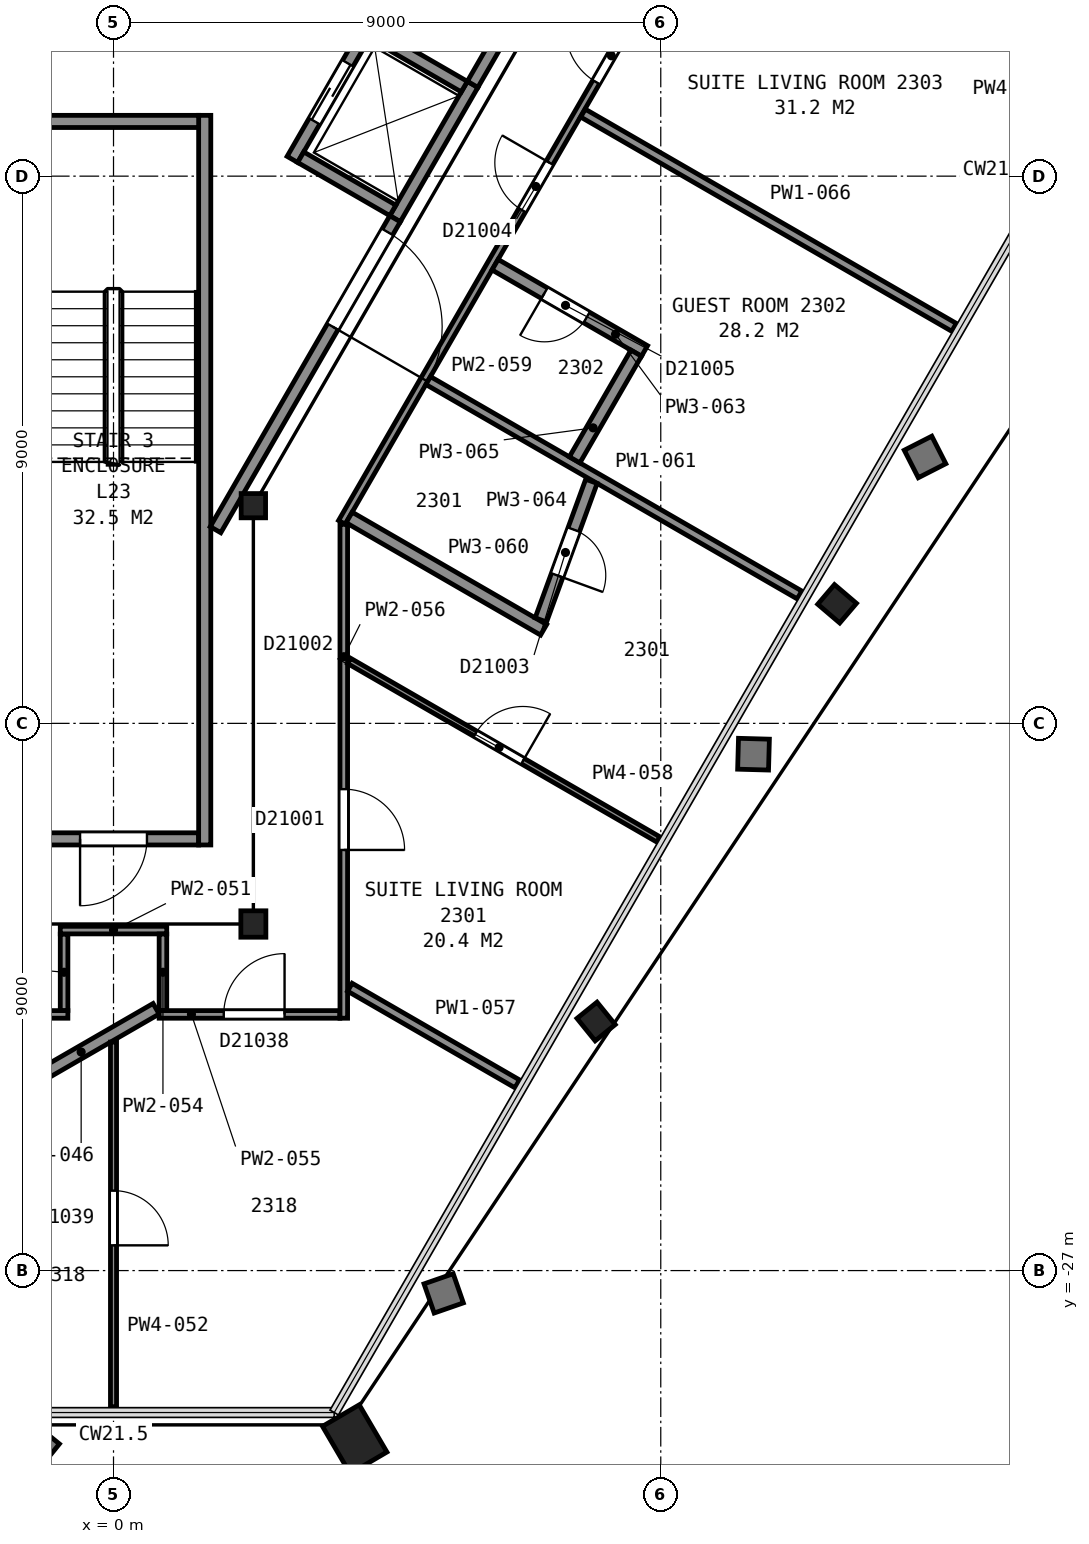
"""IFC4 building model, lengths in metres.
Left out: names, types, materials, properties, quantities, classifications, styles, units other than length and angle.
Written with IfcOpenShell. Run it as: python <this file> out.ifc"""

import sys

from ifc_helpers import new_model, si_unit, direction, frame, frame_2d, origin, origin_2d, place, context, subcontext, project, spatial, rectangle, hollow_rectangle, i_section, extrude, element, fill, save


model = new_model("IFC4")
c1 = context("Model", 3, precision=1e-05, world=origin(), true_north=direction((0.0, 1.0)))
c2 = subcontext(c1, "Body", "Model", "MODEL_VIEW")
j1 = project(units=[si_unit("LENGTHUNIT", "METRE"), si_unit("PLANEANGLEUNIT", "RADIAN")], contexts=[c1])
p1 = place(None, origin())
s1 = spatial("IfcSite", under=j1, at=p1, CompositionType="ELEMENT")
p2 = place(p1, origin())
s2 = spatial("IfcBuilding", under=s1, at=p2, CompositionType="ELEMENT")
p3 = place(p2, frame((0.0, 0.0, 100.0)))
s3 = spatial("IfcBuildingStorey", under=s2, at=p3, CompositionType="ELEMENT", Elevation=100.0)
p4 = place(p3, frame((3.838, -29.555, 0.075), z_axis=(0.111147334109, -0.189640824097, 0.975542222539), x_axis=(-0.993578089835, -0.000278243023, 0.113148141749)))
e1 = element("IfcColumn", 1, at=p4, inside=s3, PredefinedType="COLUMN", context=c2, shape_type="SweptSolid", body=[
    extrude(hollow_rectangle(XDim=0.7, YDim=0.9, WallThickness=0.065, at=origin_2d()), origin(), (0.0, 0.0, 1.0), 3.536),
])
p5 = place(p3, frame((7.786, -22.717, 0.045), z_axis=(0.127836504711, -0.157735399526, 0.979171778494), x_axis=(-0.498572298462, -0.863680403358, -0.074039341307)))
e2 = element("IfcColumn", 2, at=p5, inside=s3, PredefinedType="COLUMN", context=c2, shape_type="SweptSolid", body=[
    extrude(i_section(OverallWidth=0.424, OverallDepth=0.475, WebThickness=0.048, FlangeThickness=0.077, FilletRadius=0.015, at=origin_2d()), origin(), (0.0, 0.0, 1.0), 3.585),
])
p6 = place(p3, frame((11.726, -15.885, 0.04), z_axis=(0.147122626848, -0.12541489421, 0.981135075807), x_axis=(-0.499983433804, -0.865301512417, -0.035635074456)))
e3 = element("IfcColumn", 3, at=p6, inside=s3, PredefinedType="COLUMN", context=c2, shape_type="SweptSolid", body=[
    extrude(i_section(OverallWidth=0.424, OverallDepth=0.475, WebThickness=0.048, FlangeThickness=0.077, FilletRadius=0.015, at=origin_2d()), origin(), (0.0, 0.0, 1.0), 3.588),
])
p7 = place(p3, frame((2.3, -21.3, 0.0), z_axis=(0.0, 0.0, 1.0), x_axis=(-1.0, 0.0, 0.0)))
e4 = element("IfcColumn", 4, at=p7, inside=s3, PredefinedType="COLUMN", context=c2, shape_type="SweptSolid", body=[
    extrude(i_section(OverallWidth=0.411, OverallDepth=0.434, WebThickness=0.036, FlangeThickness=0.057, FilletRadius=0.015, at=origin_2d()), origin(), (0.0, 0.0, 1.0), 3.6),
])
p8 = place(p3, frame((2.3, -14.42, 0.0), z_axis=(0.0, 0.0, 1.0), x_axis=(1.0, 0.0, 0.0)))
e5 = element("IfcColumn", 5, at=p8, inside=s3, PredefinedType="COLUMN", context=c2, shape_type="SweptSolid", body=[
    extrude(i_section(OverallWidth=0.401, OverallDepth=0.399, WebThickness=0.025, FlangeThickness=0.04, FilletRadius=0.015, at=origin_2d()), origin(), (0.0, 0.0, 1.0), 3.6),
])
p9 = place(p3, frame((-1.4, -19.9, 0.0), z_axis=(0.0, 0.0, 1.0), x_axis=(1.0, 0.0, 0.0)))
e6 = element("IfcWall", 6, at=p9, inside=s3, PredefinedType="PARTITIONING", context=c2, shape_type="SweptSolid", body=[
    extrude(rectangle(XDim=2.8, YDim=0.2, at=frame_2d((1.4, 0.0))), origin(), (0.0, 0.0, 1.0), 3.35),
])
p10 = place(p9, frame((0.85, 0.0, 0.0)))
e7 = element("IfcOpeningElement", 7, at=p10, cuts=e6, PredefinedType="OPENING", context=c2, shape_type="SweptSolid", body=[
    extrude(rectangle(XDim=1.1, YDim=2.1, at=frame_2d((0.55, 1.05))), frame((0.0, 0.11, 0.0), z_axis=(0.0, -1.0, 0.0), x_axis=(1.0, 0.0, 0.0)), (0.0, 0.0, 1.0), 0.22),
])
p11 = place(p3, frame((1.5, -8.0, 0.0), z_axis=(0.0, 0.0, 1.0), x_axis=(0.0, -1.0, 0.0)))
e8 = element("IfcWall", 8, at=p11, inside=s3, PredefinedType="PARTITIONING", context=c2, shape_type="SweptSolid", body=[
    extrude(rectangle(XDim=12.0, YDim=0.2, at=frame_2d((6.0, 0.0))), origin(), (0.0, 0.0, 1.0), 3.35),
])
p12 = place(p3, frame((-1.4, -8.1, 0.0), z_axis=(0.0, 0.0, 1.0), x_axis=(1.0, 0.0, 0.0)))
e9 = element("IfcWall", 9, at=p12, inside=s3, PredefinedType="PARTITIONING", context=c2, shape_type="SweptSolid", body=[
    extrude(rectangle(XDim=2.8, YDim=0.2, at=frame_2d((1.4, 0.0))), origin(), (0.0, 0.0, 1.0), 3.35),
])
p13 = place(p3, frame((4.63, -9.7, 0.0), z_axis=(0.0, 0.0, 1.0), x_axis=(0.500062241894, 0.865989465428, 0.0)))
e10 = element("IfcWall", 10, at=p13, inside=s3, PredefinedType="PARTITIONING", context=c2, shape_type="SweptSolid", body=[
    extrude(rectangle(XDim=2.55, YDim=0.2, at=frame_2d((1.275, 0.0))), origin(), (0.0, 0.0, 1.0), 3.6),
])
p14 = place(p3, frame((2.942, -8.725, 0.0), z_axis=(0.0, 0.0, 1.0), x_axis=(0.500020783669, 0.866013403995, 0.0)))
e11 = element("IfcWall", 11, at=p14, inside=s3, PredefinedType="PARTITIONING", context=c2, shape_type="SweptSolid", body=[
    extrude(rectangle(XDim=2.55, YDim=0.2, at=frame_2d((1.275, 0.0))), origin(), (0.0, 0.0, 1.0), 3.6),
])
p15 = place(p14, frame((0.725, 0.0, 0.0)))
e12 = element("IfcOpeningElement", 12, at=p15, cuts=e11, PredefinedType="OPENING", context=c2, shape_type="SweptSolid", body=[
    extrude(rectangle(XDim=1.1, YDim=2.1, at=frame_2d((0.55, 1.05))), frame((0.0, 0.11, 0.0), z_axis=(0.0, -1.0, 0.0), x_axis=(1.0, 0.0, 0.0)), (0.0, 0.0, 1.0), 0.22),
])
p16 = place(p3, frame((5.769, -7.528, 0.0), z_axis=(0.0, 0.0, 1.0), x_axis=(-0.866002029911, 0.500040482552, 0.0)))
e13 = element("IfcWall", 13, at=p16, inside=s3, PredefinedType="PARTITIONING", context=c2, shape_type="SweptSolid", body=[
    extrude(rectangle(XDim=1.75, YDim=0.2, at=frame_2d((0.875, 0.0))), origin(), (0.0, 0.0, 1.0), 3.6),
])
p17 = place(p3, frame((4.594, -9.563, 0.0), z_axis=(0.0, 0.0, 1.0), x_axis=(-0.866036909293, 0.499980071345, 0.0)))
e14 = element("IfcWall", 14, at=p17, inside=s3, PredefinedType="PARTITIONING", context=c2, shape_type="SweptSolid", body=[
    extrude(rectangle(XDim=1.75, YDim=0.2, at=frame_2d((0.875, 0.0))), origin(), (0.0, 0.0, 1.0), 3.6),
])
p18 = place(p3, frame((1.677, -14.815, 0.0), z_axis=(0.0, 0.0, 1.0), x_axis=(0.49999445743, 0.866028603765, 0.0)))
e15 = element("IfcWall", 15, at=p18, inside=s3, PredefinedType="PARTITIONING", context=c2, shape_type="SweptSolid", body=[
    extrude(rectangle(XDim=5.905, YDim=0.2, at=frame_2d((2.952, 0.0))), origin(), (0.0, 0.0, 1.0), 3.35),
])
p19 = place(p18, frame((3.855, 0.0, 0.0)))
e16 = element("IfcOpeningElement", 16, at=p19, cuts=e15, PredefinedType="OPENING", context=c2, shape_type="SweptSolid", body=[
    extrude(rectangle(XDim=1.8, YDim=2.1, at=frame_2d((0.9, 1.05))), frame((0.0, 0.11, 0.0), z_axis=(0.0, -1.0, 0.0), x_axis=(1.0, 0.0, 0.0)), (0.0, 0.0, 1.0), 0.22),
])
p20 = place(p3, frame((5.906, -7.49, 0.0), z_axis=(0.0, 0.0, 1.0), x_axis=(0.500252727967, 0.865879442048, 0.0)))
e17 = element("IfcWall", 17, at=p20, inside=s3, PredefinedType="PARTITIONING", context=c2, shape_type="SweptSolid", body=[
    extrude(rectangle(XDim=2.617, YDim=0.2, at=frame_2d((1.309, 0.0))), origin(), (0.0, 0.0, 1.0), 3.35),
])
p21 = place(p3, frame((-4.32, -25.592, 0.0), z_axis=(0.0, 0.0, 1.0), x_axis=(0.86603408909, 0.499984956307, 0.0)))
e18 = element("IfcWall", 18, at=p21, inside=s3, PredefinedType="PARTITIONING", context=c2, shape_type="SweptSolid", body=[
    extrude(rectangle(XDim=5.797, YDim=0.2, at=frame_2d((2.898, 0.0))), origin(), (0.0, 0.0, 1.0), 2.613),
])
p22 = place(p21, frame((2.15, 0.0, 0.0)))
e19 = element("IfcOpeningElement", 19, at=p22, cuts=e18, PredefinedType="OPENING", context=c2, shape_type="SweptSolid", body=[
    extrude(rectangle(XDim=0.8, YDim=2.1, at=frame_2d((0.4, 1.05))), frame((0.0, 0.11, 0.0), z_axis=(0.0, -1.0, 0.0), x_axis=(1.0, 0.0, 0.0)), (0.0, 0.0, 1.0), 0.22),
])
p23 = place(p3, frame((-3.722, -22.787, 0.0), z_axis=(0.0, 0.0, 1.0), x_axis=(1.0, 0.0, 0.0)))
e20 = element("IfcWall", 20, at=p23, inside=s3, PredefinedType="PARTITIONING", context=c2, shape_type="SweptSolid", body=[
    extrude(rectangle(XDim=2.971, YDim=0.125, at=frame_2d((1.486, 0.0))), origin(), (0.0, 0.0, 1.0), 2.613),
])
p24 = place(p3, frame((-0.813, -22.722, 0.0), z_axis=(0.0, 0.0, 1.0), x_axis=(0.0, 1.0, 0.0)))
e21 = element("IfcWall", 21, at=p24, inside=s3, PredefinedType="PARTITIONING", context=c2, shape_type="SweptSolid", body=[
    extrude(rectangle(XDim=1.257, YDim=0.125, at=frame_2d((0.628, 0.0))), origin(), (0.0, 0.0, 1.0), 2.613),
])
p25 = place(p3, frame((-0.875, -21.4, 0.0), z_axis=(0.0, 0.0, 1.0), x_axis=(1.0, 0.0, 0.0)))
e22 = element("IfcWall", 22, at=p25, inside=s3, PredefinedType="PARTITIONING", context=c2, shape_type="SweptSolid", body=[
    extrude(rectangle(XDim=1.751, YDim=0.125, at=frame_2d((0.875, 0.0))), origin(), (0.0, 0.0, 1.0), 2.613),
])
p26 = place(p3, frame((0.0, -29.239, 0.0), z_axis=(0.0, 0.0, 1.0), x_axis=(0.0, 1.0, 0.0)))
e23 = element("IfcWall", 23, at=p26, inside=s3, PredefinedType="PARTITIONING", context=c2, shape_type="SweptSolid", body=[
    extrude(rectangle(XDim=5.997, YDim=0.1, at=frame_2d((2.998, 0.0))), origin(), (0.0, 0.0, 1.0), 2.613),
])
p27 = place(p26, frame((2.654, 0.0, 0.0)))
e24 = element("IfcOpeningElement", 24, at=p27, cuts=e23, PredefinedType="OPENING", context=c2, shape_type="SweptSolid", body=[
    extrude(rectangle(XDim=0.9, YDim=2.1, at=frame_2d((0.45, 1.05))), frame((0.0, 0.06, 0.0), z_axis=(0.0, -1.0, 0.0), x_axis=(1.0, 0.0, 0.0)), (0.0, 0.0, 1.0), 0.12),
])
p28 = place(p3, frame((0.813, -22.722, 0.0), z_axis=(0.0, 0.0, 1.0), x_axis=(0.0, 1.0, 0.0)))
e25 = element("IfcWall", 25, at=p28, inside=s3, PredefinedType="PARTITIONING", context=c2, shape_type="SweptSolid", body=[
    extrude(rectangle(XDim=1.257, YDim=0.125, at=frame_2d((0.628, 0.0))), origin(), (0.0, 0.0, 1.0), 2.613),
])
p29 = place(p3, frame((3.722, -22.787, 0.0), z_axis=(0.0, 0.0, 1.0), x_axis=(-1.0, 0.0, 0.0)))
e26 = element("IfcWall", 26, at=p29, inside=s3, PredefinedType="PARTITIONING", context=c2, shape_type="SweptSolid", body=[
    extrude(rectangle(XDim=2.971, YDim=0.125, at=frame_2d((1.486, 0.0))), origin(), (0.0, 0.0, 1.0), 2.613),
])
p30 = place(p29, frame((0.909, 0.0, 0.0)))
e27 = element("IfcOpeningElement", 27, at=p30, cuts=e26, PredefinedType="OPENING", context=c2, shape_type="SweptSolid", body=[
    extrude(rectangle(XDim=1.0, YDim=2.1, at=frame_2d((0.5, 1.05))), frame((0.0, 0.073, 0.0), z_axis=(0.0, -1.0, 0.0), x_axis=(1.0, 0.0, 0.0)), (0.0, 0.0, 1.0), 0.145),
])
p31 = place(p3, frame((3.787, -14.725, 0.0), z_axis=(0.0, 0.0, 1.0), x_axis=(0.0, -1.0, 0.0)))
e28 = element("IfcWall", 28, at=p31, inside=s3, PredefinedType="PARTITIONING", context=c2, shape_type="SweptSolid", body=[
    extrude(rectangle(XDim=8.125, YDim=0.125, at=frame_2d((4.062, 0.0))), origin(), (0.0, 0.0, 1.0), 2.613),
])
p32 = place(p31, frame((4.357, 0.0, 0.0)))
e29 = element("IfcOpeningElement", 29, at=p32, cuts=e28, PredefinedType="OPENING", context=c2, shape_type="SweptSolid", body=[
    extrude(rectangle(XDim=1.0, YDim=2.1, at=frame_2d((0.5, 1.05))), frame((0.0, 0.073, 0.0), z_axis=(0.0, -1.0, 0.0), x_axis=(1.0, 0.0, 0.0)), (0.0, 0.0, 1.0), 0.145),
])
p33 = place(p3, frame((3.887, -22.34, 0.0), z_axis=(0.0, 0.0, 1.0), x_axis=(0.866065365018, -0.499930778725, 0.0)))
e30 = element("IfcWall", 30, at=p33, inside=s3, PredefinedType="PARTITIONING", context=c2, shape_type="SweptSolid", body=[
    extrude(rectangle(XDim=3.179, YDim=0.15, at=frame_2d((1.589, 0.0))), origin(), (0.0, 0.0, 1.0), 2.613),
])
p34 = place(p3, frame((3.875, -16.972, 0.0), z_axis=(0.0, 0.0, 1.0), x_axis=(0.86602429061, -0.500001928069, 0.0)))
e31 = element("IfcWall", 31, at=p34, inside=s3, PredefinedType="PARTITIONING", context=c2, shape_type="SweptSolid", body=[
    extrude(rectangle(XDim=5.873, YDim=0.1, at=frame_2d((2.937, 0.0))), origin(), (0.0, 0.0, 1.0), 2.613),
])
p35 = place(p34, frame((2.399, 0.0, 0.0)))
e32 = element("IfcOpeningElement", 32, at=p35, cuts=e31, PredefinedType="OPENING", context=c2, shape_type="SweptSolid", body=[
    extrude(rectangle(XDim=0.9, YDim=2.1, at=frame_2d((0.45, 1.05))), frame((0.0, 0.06, 0.0), z_axis=(0.0, -1.0, 0.0), x_axis=(1.0, 0.0, 0.0)), (0.0, 0.0, 1.0), 0.12),
])
p36 = place(p3, frame((8.766, -6.017, 0.0), z_axis=(0.0, 0.0, 1.0), x_axis=(-0.500051472265, -0.865995684219, 0.0)))
e33 = element("IfcWall", 33, at=p36, inside=s3, PredefinedType="PARTITIONING", context=c2, shape_type="SweptSolid", body=[
    extrude(rectangle(XDim=10.02, YDim=0.125, at=frame_2d((5.01, 0.0))), origin(), (0.0, 0.0, 1.0), 2.613),
])
p37 = place(p36, frame((3.19, 0.0, 0.0)))
e34 = element("IfcOpeningElement", 34, at=p37, cuts=e33, PredefinedType="OPENING", context=c2, shape_type="SweptSolid", body=[
    extrude(rectangle(XDim=0.9, YDim=2.1, at=frame_2d((0.45, 1.05))), frame((0.0, 0.073, 0.0), z_axis=(0.0, -1.0, 0.0), x_axis=(1.0, 0.0, 0.0)), (0.0, 0.0, 1.0), 0.145),
])
p38 = place(p36, frame((0.658, 0.0, 0.0)))
e35 = element("IfcOpeningElement", 35, at=p38, cuts=e33, PredefinedType="OPENING", context=c2, shape_type="SweptSolid", body=[
    extrude(rectangle(XDim=1.0, YDim=2.1, at=frame_2d((0.5, 1.05))), frame((0.0, 0.073, 0.0), z_axis=(0.0, -1.0, 0.0), x_axis=(1.0, 0.0, 0.0)), (0.0, 0.0, 1.0), 0.145),
])
p39 = place(p3, frame((3.875, -14.613, 0.0), z_axis=(0.0, 0.0, 1.0), x_axis=(0.865890522866, -0.500233547866, 0.0)))
e36 = element("IfcWall", 36, at=p39, inside=s3, PredefinedType="PARTITIONING", context=c2, shape_type="SweptSolid", body=[
    extrude(rectangle(XDim=3.694, YDim=0.2, at=frame_2d((1.847, 0.0))), origin(), (0.0, 0.0, 1.0), 2.613),
])
p40 = place(p3, frame((5.175, -12.362, 0.0), z_axis=(0.0, 0.0, 1.0), x_axis=(0.866031654768, -0.499989172823, 0.0)))
e37 = element("IfcWall", 37, at=p40, inside=s3, PredefinedType="PARTITIONING", context=c2, shape_type="SweptSolid", body=[
    extrude(rectangle(XDim=7.052, YDim=0.15, at=frame_2d((3.526, 0.0))), origin(), (0.0, 0.0, 1.0), 2.613),
])
p41 = place(p3, frame((8.733, -11.875, 0.0), z_axis=(0.0, 0.0, 1.0), x_axis=(-0.866048046904, 0.499960778915, 0.0)))
e38 = element("IfcWall", 38, at=p41, inside=s3, PredefinedType="PARTITIONING", context=c2, shape_type="SweptSolid", body=[
    extrude(rectangle(XDim=2.838, YDim=0.2, at=frame_2d((1.419, 0.0))), origin(), (0.0, 0.0, 1.0), 2.613),
])
p42 = place(p41, frame((1.1, 0.0, 0.0)))
e39 = element("IfcOpeningElement", 39, at=p42, cuts=e38, PredefinedType="OPENING", context=c2, shape_type="SweptSolid", body=[
    extrude(rectangle(XDim=0.8, YDim=2.1, at=frame_2d((0.4, 1.05))), frame((0.0, 0.11, 0.0), z_axis=(0.0, -1.0, 0.0), x_axis=(1.0, 0.0, 0.0)), (0.0, 0.0, 1.0), 0.22),
])
p43 = place(p3, frame((7.028, -16.298, 0.0), z_axis=(0.0, 0.0, 1.0), x_axis=(0.342817359533, 0.939402074728, 0.0)))
e40 = element("IfcWall", 40, at=p43, inside=s3, PredefinedType="PARTITIONING", context=c2, shape_type="SweptSolid", body=[
    extrude(rectangle(XDim=2.426, YDim=0.2, at=frame_2d((1.213, 0.0))), origin(), (0.0, 0.0, 1.0), 2.613),
])
p44 = place(p43, frame((0.78, 0.0, 0.0)))
e41 = element("IfcOpeningElement", 41, at=p44, cuts=e40, PredefinedType="OPENING", context=c2, shape_type="SweptSolid", body=[
    extrude(rectangle(XDim=0.8, YDim=2.1, at=frame_2d((0.4, 1.05))), frame((0.0, 0.11, 0.0), z_axis=(0.0, -1.0, 0.0), x_axis=(1.0, 0.0, 0.0)), (0.0, 0.0, 1.0), 0.22),
])
p45 = place(p3, frame((7.583, -13.666, 0.0), z_axis=(0.0, 0.0, 1.0), x_axis=(0.49983374806, 0.866121368112, 0.0)))
e42 = element("IfcWall", 42, at=p45, inside=s3, PredefinedType="PARTITIONING", context=c2, shape_type="SweptSolid", body=[
    extrude(rectangle(XDim=2.026, YDim=0.2, at=frame_2d((1.013, 0.0))), origin(), (0.0, 0.0, 1.0), 2.613),
])
p46 = place(p3, frame((7.72, -7.963, 0.0), z_axis=(0.0, 0.0, 1.0), x_axis=(0.865980767462, -0.500077304409, 0.0)))
e43 = element("IfcWall", 43, at=p46, inside=s3, PredefinedType="PARTITIONING", context=c2, shape_type="SweptSolid", body=[
    extrude(rectangle(XDim=7.047, YDim=0.15, at=frame_2d((3.524, 0.0))), origin(), (0.0, 0.0, 1.0), 2.613),
])
p47 = place(p3, frame((10.037, -3.94, 0.0), z_axis=(0.0, 0.0, 1.0), x_axis=(0.866063951978, -0.499933226626, 0.0)))
e44 = element("IfcWall", 44, at=p47, inside=s3, PredefinedType="PARTITIONING", context=c2, shape_type="SweptSolid", body=[
    extrude(rectangle(XDim=7.052, YDim=0.1, at=frame_2d((3.526, 0.0))), origin(), (0.0, 0.0, 1.0), 2.613),
])
p48 = place(p47, frame((3.038, 0.0, 0.0)))
e45 = element("IfcOpeningElement", 45, at=p48, cuts=e44, PredefinedType="OPENING", context=c2, shape_type="SweptSolid", body=[
    extrude(rectangle(XDim=0.9, YDim=2.1, at=frame_2d((0.45, 1.05))), frame((0.0, 0.06, 0.0), z_axis=(0.0, -1.0, 0.0), x_axis=(1.0, 0.0, 0.0)), (0.0, 0.0, 1.0), 0.12),
])
p49 = place(p10, origin())
e46 = element("IfcDoor", 46, at=p49, inside=s3, OperationType="SINGLE_SWING_LEFT", PredefinedType="DOOR", context=c2, shape_type="SweptSolid", body=[
    extrude(rectangle(XDim=1.1, YDim=2.1, at=frame_2d((0.55, 1.05))), frame((0.0, 0.025, 0.0), z_axis=(0.0, -1.0, 0.0), x_axis=(1.0, 0.0, 0.0)), (0.0, 0.0, 1.0), 0.05),
])
fill(e7, e46)
p50 = place(p15, origin())
e47 = element("IfcDoor", 47, at=p50, inside=s3, OperationType="SLIDING_TO_RIGHT", PredefinedType="DOOR", context=c2, shape_type="SweptSolid", body=[
    extrude(rectangle(XDim=1.1, YDim=2.1, at=frame_2d((0.55, 1.05))), frame((0.0, 0.025, 0.0), z_axis=(0.0, -1.0, 0.0), x_axis=(1.0, 0.0, 0.0)), (0.0, 0.0, 1.0), 0.05),
])
fill(e12, e47)
p51 = place(p19, origin())
e48 = element("IfcDoor", 48, at=p51, inside=s3, OperationType="DOUBLE_DOOR_SINGLE_SWING", PredefinedType="DOOR", context=c2, shape_type="SweptSolid", body=[
    extrude(rectangle(XDim=1.8, YDim=2.1, at=frame_2d((0.9, 1.05))), frame((0.0, 0.025, 0.0), z_axis=(0.0, -1.0, 0.0), x_axis=(1.0, 0.0, 0.0)), (0.0, 0.0, 1.0), 0.05),
])
fill(e16, e48)
p52 = place(p27, origin())
e49 = element("IfcDoor", 49, at=p52, inside=s3, OperationType="SINGLE_SWING_LEFT", PredefinedType="DOOR", context=c2, shape_type="SweptSolid", body=[
    extrude(rectangle(XDim=0.9, YDim=2.1, at=frame_2d((0.45, 1.05))), frame((0.0, 0.025, 0.0), z_axis=(0.0, -1.0, 0.0), x_axis=(1.0, 0.0, 0.0)), (0.0, 0.0, 1.0), 0.05),
])
fill(e24, e49)
p53 = place(p30, origin())
e50 = element("IfcDoor", 50, at=p53, inside=s3, OperationType="SINGLE_SWING_LEFT", PredefinedType="DOOR", context=c2, shape_type="SweptSolid", body=[
    extrude(rectangle(XDim=1.0, YDim=2.1, at=frame_2d((0.5, 1.05))), frame((0.0, 0.025, 0.0), z_axis=(0.0, -1.0, 0.0), x_axis=(1.0, 0.0, 0.0)), (0.0, 0.0, 1.0), 0.05),
])
fill(e27, e50)
p54 = place(p32, origin())
e51 = element("IfcDoor", 51, at=p54, inside=s3, OperationType="SINGLE_SWING_RIGHT", PredefinedType="DOOR", context=c2, shape_type="SweptSolid", body=[
    extrude(rectangle(XDim=1.0, YDim=2.1, at=frame_2d((0.5, 1.05))), frame((0.0, 0.025, 0.0), z_axis=(0.0, -1.0, 0.0), x_axis=(1.0, 0.0, 0.0)), (0.0, 0.0, 1.0), 0.05),
])
fill(e29, e51)
p55 = place(p35, origin())
e52 = element("IfcDoor", 52, at=p55, inside=s3, OperationType="SINGLE_SWING_RIGHT", PredefinedType="DOOR", context=c2, shape_type="SweptSolid", body=[
    extrude(rectangle(XDim=0.9, YDim=2.1, at=frame_2d((0.45, 1.05))), frame((0.0, 0.025, 0.0), z_axis=(0.0, -1.0, 0.0), x_axis=(1.0, 0.0, 0.0)), (0.0, 0.0, 1.0), 0.05),
])
fill(e32, e52)
p56 = place(p37, origin())
e53 = element("IfcDoor", 53, at=p56, inside=s3, OperationType="SINGLE_SWING_LEFT", PredefinedType="DOOR", context=c2, shape_type="SweptSolid", body=[
    extrude(rectangle(XDim=0.9, YDim=2.1, at=frame_2d((0.45, 1.05))), frame((0.0, 0.025, 0.0), z_axis=(0.0, -1.0, 0.0), x_axis=(1.0, 0.0, 0.0)), (0.0, 0.0, 1.0), 0.05),
])
fill(e34, e53)
p57 = place(p38, origin())
e54 = element("IfcDoor", 54, at=p57, inside=s3, OperationType="SINGLE_SWING_LEFT", PredefinedType="DOOR", context=c2, shape_type="SweptSolid", body=[
    extrude(rectangle(XDim=1.0, YDim=2.1, at=frame_2d((0.5, 1.05))), frame((0.0, 0.025, 0.0), z_axis=(0.0, -1.0, 0.0), x_axis=(1.0, 0.0, 0.0)), (0.0, 0.0, 1.0), 0.05),
])
fill(e35, e54)
p58 = place(p42, origin())
e55 = element("IfcDoor", 55, at=p58, inside=s3, OperationType="SINGLE_SWING_RIGHT", PredefinedType="DOOR", context=c2, shape_type="SweptSolid", body=[
    extrude(rectangle(XDim=0.8, YDim=2.1, at=frame_2d((0.4, 1.05))), frame((0.0, 0.025, 0.0), z_axis=(0.0, -1.0, 0.0), x_axis=(1.0, 0.0, 0.0)), (0.0, 0.0, 1.0), 0.05),
])
fill(e39, e55)
p59 = place(p44, origin())
e56 = element("IfcDoor", 56, at=p59, inside=s3, OperationType="SINGLE_SWING_LEFT", PredefinedType="DOOR", context=c2, shape_type="SweptSolid", body=[
    extrude(rectangle(XDim=0.8, YDim=2.1, at=frame_2d((0.4, 1.05))), frame((0.0, 0.025, 0.0), z_axis=(0.0, -1.0, 0.0), x_axis=(1.0, 0.0, 0.0)), (0.0, 0.0, 1.0), 0.05),
])
fill(e41, e56)
save(model, sys.argv[1])
